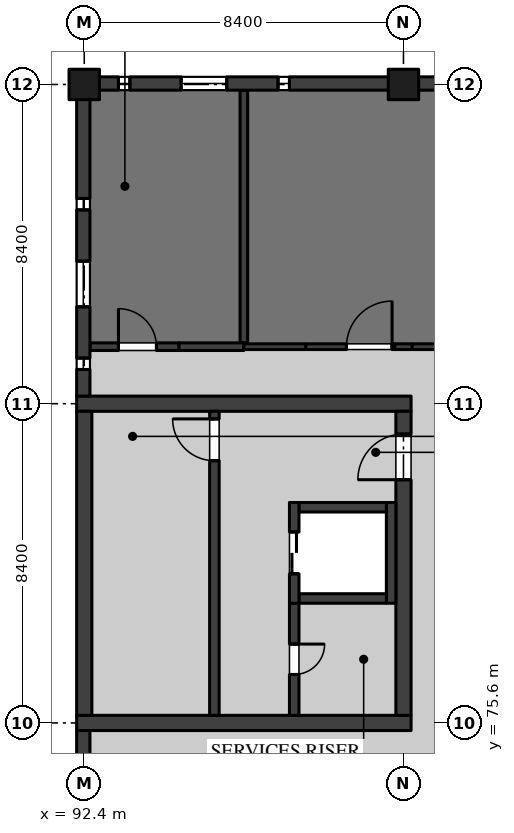
"""IFC4 building model, lengths in metres.
Left out: names, types, materials, properties, quantities, classifications, styles, units other than length and angle.
Written with IfcOpenShell. Run it as: python <this file> out.ifc"""

import sys

from ifc_helpers import new_model, si_unit, direction, frame, frame_2d, origin, origin_2d, place, context, subcontext, project, spatial, rectangle, extrude, element, fill, save


model = new_model("IFC4")
c1 = context("Model", 3, precision=1e-05, world=origin(), true_north=direction((0.0, 1.0)))
c2 = subcontext(c1, "Body", "Model", "MODEL_VIEW")
j1 = project(units=[si_unit("LENGTHUNIT", "METRE"), si_unit("PLANEANGLEUNIT", "RADIAN")], contexts=[c1])
p1 = place(None, origin())
s1 = spatial("IfcSite", under=j1, at=p1, CompositionType="ELEMENT")
p2 = place(p1, origin())
s2 = spatial("IfcBuilding", under=s1, at=p2, CompositionType="ELEMENT")
p3 = place(p2, frame((0.0, 0.0, 5.4)))
s3 = spatial("IfcBuildingStorey", under=s2, at=p3, CompositionType="ELEMENT", Elevation=5.4)
for number, where, z_axis, x_axis in (
    (1, (92.4, 92.4, 0.0), (0.0, 0.0, 1.0), (1.0, 0.0, 0.0)),
    (2, (100.8, 92.4, 0.0), (0.0, 0.0, 1.0), (1.0, 0.0, 0.0)),
):
    element("IfcColumn", number, at=place(p3, frame(where, z_axis=z_axis, x_axis=x_axis)), inside=s3, PredefinedType="COLUMN", context=c2, shape_type="SweptSolid", body=[
        extrude(rectangle(XDim=0.8, YDim=0.8, at=origin_2d()), origin(), (0.0, 0.0, 1.0), 4.37),
    ])
for number, where, z_axis, x_axis in (
    (3, (92.2, 75.6, 0.0), (0.0, 0.0, 1.0), (1.0, 0.0, 0.0)),
    (4, (92.2, 84.0, 0.0), (0.0, 0.0, 1.0), (1.0, 0.0, 0.0)),
):
    element("IfcWall", number, at=place(p3, frame(where, z_axis=z_axis, x_axis=x_axis)), inside=s3, PredefinedType="SHEAR", context=c2, shape_type="SweptSolid", body=[
        extrude(rectangle(XDim=8.8, YDim=0.4, at=frame_2d((4.4, 0.0))), origin(), (0.0, 0.0, 1.0), 4.37),
    ])
p4 = place(p3, frame((92.4, 75.8, 0.0), z_axis=(0.0, 0.0, 1.0), x_axis=(0.0, 1.0, 0.0)))
e5 = element("IfcWall", 5, at=p4, inside=s3, PredefinedType="SHEAR", context=c2, shape_type="SweptSolid", body=[
    extrude(rectangle(XDim=8.0, YDim=0.4, at=frame_2d((4.0, 0.0))), origin(), (0.0, 0.0, 1.0), 4.37),
])
p5 = place(p3, frame((100.8, 75.8, 0.0), z_axis=(0.0, 0.0, 1.0), x_axis=(0.0, 1.0, 0.0)))
e6 = element("IfcWall", 6, at=p5, inside=s3, PredefinedType="SHEAR", context=c2, shape_type="SweptSolid", body=[
    extrude(rectangle(XDim=8.0, YDim=0.4, at=frame_2d((4.0, 0.0))), origin(), (0.0, 0.0, 1.0), 4.37),
])
p6 = place(p5, frame((6.2, 0.0, 0.0)))
e7 = element("IfcOpeningElement", 7, at=p6, cuts=e6, PredefinedType="OPENING", context=c2, shape_type="SweptSolid", body=[
    extrude(rectangle(XDim=1.2, YDim=2.1, at=frame_2d((0.6, 1.05))), frame((0.0, 0.21, 0.0), z_axis=(0.0, -1.0, 0.0), x_axis=(1.0, 0.0, 0.0)), (0.0, 0.0, 1.0), 0.42),
])
p7 = place(p3, frame((95.825, 83.8, 0.0), z_axis=(0.0, 0.0, 1.0), x_axis=(0.0, -1.0, 0.0)))
e8 = element("IfcWall", 8, at=p7, inside=s3, PredefinedType="SOLIDWALL", context=c2, shape_type="SweptSolid", body=[
    extrude(rectangle(XDim=8.0, YDim=0.25, at=frame_2d((4.0, 0.0))), origin(), (0.0, 0.0, 1.0), 4.37),
])
p8 = place(p7, frame((0.2, 0.0, 0.0)))
e9 = element("IfcOpeningElement", 9, at=p8, cuts=e8, PredefinedType="OPENING", context=c2, shape_type="SweptSolid", body=[
    extrude(rectangle(XDim=1.1, YDim=2.1, at=frame_2d((0.55, 1.05))), frame((0.0, 0.135, 0.0), z_axis=(0.0, -1.0, 0.0), x_axis=(1.0, 0.0, 0.0)), (0.0, 0.0, 1.0), 0.27),
])
p9 = place(p3, frame((97.925, 78.75, 0.0), z_axis=(0.0, 0.0, 1.0), x_axis=(0.0, -1.0, 0.0)))
e10 = element("IfcWall", 10, at=p9, inside=s3, PredefinedType="SOLIDWALL", context=c2, shape_type="SweptSolid", body=[
    extrude(rectangle(XDim=2.95, YDim=0.25, at=frame_2d((1.475, 0.0))), origin(), (0.0, 0.0, 1.0), 4.37),
])
p10 = place(p9, frame((1.075, 0.0, 0.0)))
e11 = element("IfcOpeningElement", 11, at=p10, cuts=e10, PredefinedType="OPENING", context=c2, shape_type="SweptSolid", body=[
    extrude(rectangle(XDim=0.8, YDim=2.1, at=frame_2d((0.4, 1.05))), frame((0.0, 0.135, 0.0), z_axis=(0.0, -1.0, 0.0), x_axis=(1.0, 0.0, 0.0)), (0.0, 0.0, 1.0), 0.27),
])
p11 = place(p3, frame((100.475, 78.75, 0.0), z_axis=(0.0, 0.0, 1.0), x_axis=(0.0, 1.0, 0.0)))
e12 = element("IfcWall", 12, at=p11, inside=s3, PredefinedType="SOLIDWALL", context=c2, shape_type="SweptSolid", body=[
    extrude(rectangle(XDim=2.65, YDim=0.25, at=frame_2d((1.325, 0.0))), origin(), (0.0, 0.0, 1.0), 4.37),
])
for number, where, z_axis, x_axis in (
    (13, (98.05, 81.275, 0.0), (0.0, 0.0, 1.0), (1.0, 0.0, 0.0)),
    (14, (98.05, 78.875, 0.0), (0.0, 0.0, 1.0), (1.0, 0.0, 0.0)),
):
    element("IfcWall", number, at=place(p3, frame(where, z_axis=z_axis, x_axis=x_axis)), inside=s3, PredefinedType="SOLIDWALL", context=c2, shape_type="SweptSolid", body=[
        extrude(rectangle(XDim=2.3, YDim=0.25, at=frame_2d((1.15, 0.0))), origin(), (0.0, 0.0, 1.0), 4.37),
    ])
p12 = place(p3, frame((97.925, 78.75, 0.0), z_axis=(0.0, 0.0, 1.0), x_axis=(0.0, 1.0, 0.0)))
e15 = element("IfcWall", 15, at=p12, inside=s3, PredefinedType="SOLIDWALL", context=c2, shape_type="SweptSolid", body=[
    extrude(rectangle(XDim=2.65, YDim=0.25, at=frame_2d((1.325, 0.0))), origin(), (0.0, 0.0, 1.0), 4.37),
])
p13 = place(p12, frame((0.775, 0.0, 0.0)))
e16 = element("IfcOpeningElement", 16, at=p13, cuts=e15, PredefinedType="OPENING", context=c2, shape_type="SweptSolid", body=[
    extrude(rectangle(XDim=1.1, YDim=2.1, at=frame_2d((0.55, 1.05))), frame((0.0, 0.135, 0.0), z_axis=(0.0, -1.0, 0.0), x_axis=(1.0, 0.0, 0.0)), (0.0, 0.0, 1.0), 0.27),
])
p14 = place(p3, frame((96.6, 85.6, 0.0), z_axis=(0.0, 0.0, 1.0), x_axis=(0.0, 1.0, 0.0)))
e17 = element("IfcWall", 17, at=p14, inside=s3, PredefinedType="PARTITIONING", context=c2, shape_type="SweptSolid", body=[
    extrude(rectangle(XDim=6.65, YDim=0.2, at=frame_2d((3.325, 0.0))), origin(), (0.0, 0.0, 1.0), 4.37),
])
p15 = place(p3, frame((92.55, 85.5, 0.0), z_axis=(0.0, 0.0, 1.0), x_axis=(1.0, 0.0, 0.0)))
e18 = element("IfcWall", 18, at=p15, inside=s3, PredefinedType="PARTITIONING", context=c2, shape_type="SweptSolid", body=[
    extrude(rectangle(XDim=2.345, YDim=0.2, at=frame_2d((1.172, 0.0))), origin(), (0.0, 0.0, 1.0), 4.37),
])
p16 = place(p15, frame((0.75, 0.0, 0.0)))
e19 = element("IfcOpeningElement", 19, at=p16, cuts=e18, PredefinedType="OPENING", context=c2, shape_type="SweptSolid", body=[
    extrude(rectangle(XDim=1.0, YDim=2.1, at=frame_2d((0.5, 1.05))), frame((0.0, 0.11, 0.0), z_axis=(0.0, -1.0, 0.0), x_axis=(1.0, 0.0, 0.0)), (0.0, 0.0, 1.0), 0.22),
])
p17 = place(p3, frame((94.895, 85.5, 0.0), z_axis=(0.0, 0.0, 1.0), x_axis=(1.0, 0.0, 0.0)))
e20 = element("IfcWall", 20, at=p17, inside=s3, PredefinedType="PARTITIONING", context=c2, shape_type="SweptSolid", body=[
    extrude(rectangle(XDim=1.705, YDim=0.2, at=frame_2d((0.853, 0.0))), origin(), (0.0, 0.0, 1.0), 3.895),
])
p18 = place(p3, frame((96.6, 85.5, 0.0), z_axis=(0.0, 0.0, 1.0), x_axis=(1.0, 0.0, 0.0)))
e21 = element("IfcWall", 21, at=p18, inside=s3, PredefinedType="PARTITIONING", context=c2, shape_type="SweptSolid", body=[
    extrude(rectangle(XDim=1.63, YDim=0.15, at=frame_2d((0.815, 0.0))), origin(), (0.0, 0.0, 1.0), 3.895),
])
p19 = place(p3, frame((98.23, 85.5, 0.0), z_axis=(0.0, 0.0, 1.0), x_axis=(1.0, 0.0, 0.0)))
e22 = element("IfcWall", 22, at=p19, inside=s3, PredefinedType="PARTITIONING", context=c2, shape_type="SweptSolid", body=[
    extrude(rectangle(XDim=2.34, YDim=0.15, at=frame_2d((1.17, 0.0))), origin(), (0.0, 0.0, 1.0), 4.37),
])
p20 = place(p19, frame((1.07, 0.0, 0.0)))
e23 = element("IfcOpeningElement", 23, at=p20, cuts=e22, PredefinedType="OPENING", context=c2, shape_type="SweptSolid", body=[
    extrude(rectangle(XDim=1.2, YDim=2.4, at=frame_2d((0.6, 1.2))), frame((0.0, 0.085, 0.0), z_axis=(0.0, -1.0, 0.0), x_axis=(1.0, 0.0, 0.0)), (0.0, 0.0, 1.0), 0.17),
])
p21 = place(p3, frame((100.57, 85.5, 0.0), z_axis=(0.0, 0.0, 1.0), x_axis=(1.0, 0.0, 0.0)))
e24 = element("IfcWall", 24, at=p21, inside=s3, PredefinedType="PARTITIONING", context=c2, shape_type="SweptSolid", body=[
    extrude(rectangle(XDim=0.46, YDim=0.15, at=frame_2d((0.23, 0.0))), origin(), (0.0, 0.0, 1.0), 3.746),
])
p22 = place(p3, frame((101.03, 85.5, 0.0), z_axis=(0.0, 0.0, 1.0), x_axis=(1.0, 0.0, 0.0)))
e25 = element("IfcWall", 25, at=p22, inside=s3, PredefinedType="PARTITIONING", context=c2, shape_type="SweptSolid", body=[
    extrude(rectangle(XDim=2.34, YDim=0.15, at=frame_2d((1.17, 0.0))), origin(), (0.0, 0.0, 1.0), 4.37),
])
p23 = place(p3, frame((108.82, 92.425, 0.0), z_axis=(0.0, 0.0, 1.0), x_axis=(-1.0, 0.0, 0.0)))
e26 = element("IfcWall", 26, at=p23, inside=s3, PredefinedType="SOLIDWALL", context=c2, shape_type="SweptSolid", body=[
    extrude(rectangle(XDim=7.64, YDim=0.35, at=frame_2d((3.82, 0.0))), origin(), (0.0, 0.0, 1.0), 3.746),
])
p24 = place(p23, frame((2.62, 0.0, 1.5)))
e27 = element("IfcOpeningElement", 27, at=p24, cuts=e26, PredefinedType="OPENING", context=c2, shape_type="SweptSolid", body=[
    extrude(rectangle(XDim=0.3, YDim=1.5, at=frame_2d((0.15, 0.75))), frame((0.0, 0.185, 0.0), z_axis=(0.0, -1.0, 0.0), x_axis=(1.0, 0.0, 0.0)), (0.0, 0.0, 1.0), 0.37),
])
p25 = place(p23, frame((4.27, 0.0, 1.5)))
e28 = element("IfcOpeningElement", 28, at=p25, cuts=e26, PredefinedType="OPENING", context=c2, shape_type="SweptSolid", body=[
    extrude(rectangle(XDim=1.2, YDim=1.8, at=frame_2d((0.6, 0.9))), frame((0.0, 0.185, 0.0), z_axis=(0.0, -1.0, 0.0), x_axis=(1.0, 0.0, 0.0)), (0.0, 0.0, 1.0), 0.37),
])
p26 = place(p23, frame((6.82, 0.0, 1.5)))
e29 = element("IfcOpeningElement", 29, at=p26, cuts=e26, PredefinedType="OPENING", context=c2, shape_type="SweptSolid", body=[
    extrude(rectangle(XDim=0.3, YDim=1.5, at=frame_2d((0.15, 0.75))), frame((0.0, 0.185, 0.0), z_axis=(0.0, -1.0, 0.0), x_axis=(1.0, 0.0, 0.0)), (0.0, 0.0, 1.0), 0.37),
])
p27 = place(p3, frame((100.42, 92.425, 0.0), z_axis=(0.0, 0.0, 1.0), x_axis=(-1.0, 0.0, 0.0)))
e30 = element("IfcWall", 30, at=p27, inside=s3, PredefinedType="SOLIDWALL", context=c2, shape_type="SweptSolid", body=[
    extrude(rectangle(XDim=7.64, YDim=0.35, at=frame_2d((3.82, 0.0))), origin(), (0.0, 0.0, 1.0), 3.746),
])
p28 = place(p27, frame((2.62, 0.0, 1.5)))
e31 = element("IfcOpeningElement", 31, at=p28, cuts=e30, PredefinedType="OPENING", context=c2, shape_type="SweptSolid", body=[
    extrude(rectangle(XDim=0.3, YDim=1.5, at=frame_2d((0.15, 0.75))), frame((0.0, 0.185, 0.0), z_axis=(0.0, -1.0, 0.0), x_axis=(1.0, 0.0, 0.0)), (0.0, 0.0, 1.0), 0.37),
])
p29 = place(p27, frame((4.27, 0.0, 1.5)))
e32 = element("IfcOpeningElement", 32, at=p29, cuts=e30, PredefinedType="OPENING", context=c2, shape_type="SweptSolid", body=[
    extrude(rectangle(XDim=1.2, YDim=1.8, at=frame_2d((0.6, 0.9))), frame((0.0, 0.185, 0.0), z_axis=(0.0, -1.0, 0.0), x_axis=(1.0, 0.0, 0.0)), (0.0, 0.0, 1.0), 0.37),
])
p30 = place(p27, frame((6.82, 0.0, 1.5)))
e33 = element("IfcOpeningElement", 33, at=p30, cuts=e30, PredefinedType="OPENING", context=c2, shape_type="SweptSolid", body=[
    extrude(rectangle(XDim=0.3, YDim=1.5, at=frame_2d((0.15, 0.75))), frame((0.0, 0.185, 0.0), z_axis=(0.0, -1.0, 0.0), x_axis=(1.0, 0.0, 0.0)), (0.0, 0.0, 1.0), 0.37),
])
p31 = place(p3, frame((92.375, 92.02, 0.0), z_axis=(0.0, 0.0, 1.0), x_axis=(0.0, -1.0, 0.0)))
e34 = element("IfcWall", 34, at=p31, inside=s3, PredefinedType="SOLIDWALL", context=c2, shape_type="SweptSolid", body=[
    extrude(rectangle(XDim=7.82, YDim=0.35, at=frame_2d((3.91, 0.0))), origin(), (0.0, 0.0, 1.0), 3.746),
])
p32 = place(p31, frame((2.62, 0.0, 1.5)))
e35 = element("IfcOpeningElement", 35, at=p32, cuts=e34, PredefinedType="OPENING", context=c2, shape_type="SweptSolid", body=[
    extrude(rectangle(XDim=0.3, YDim=1.5, at=frame_2d((0.15, 0.75))), frame((0.0, 0.185, 0.0), z_axis=(0.0, -1.0, 0.0), x_axis=(1.0, 0.0, 0.0)), (0.0, 0.0, 1.0), 0.37),
])
p33 = place(p31, frame((4.27, 0.0, 1.5)))
e36 = element("IfcOpeningElement", 36, at=p33, cuts=e34, PredefinedType="OPENING", context=c2, shape_type="SweptSolid", body=[
    extrude(rectangle(XDim=1.2, YDim=1.5, at=frame_2d((0.6, 0.75))), frame((0.0, 0.185, 0.0), z_axis=(0.0, -1.0, 0.0), x_axis=(1.0, 0.0, 0.0)), (0.0, 0.0, 1.0), 0.37),
])
p34 = place(p31, frame((6.82, 0.0, 1.5)))
e37 = element("IfcOpeningElement", 37, at=p34, cuts=e34, PredefinedType="OPENING", context=c2, shape_type="SweptSolid", body=[
    extrude(rectangle(XDim=0.3, YDim=1.5, at=frame_2d((0.15, 0.75))), frame((0.0, 0.185, 0.0), z_axis=(0.0, -1.0, 0.0), x_axis=(1.0, 0.0, 0.0)), (0.0, 0.0, 1.0), 0.37),
])
p35 = place(p3, frame((92.375, 75.4, 0.0), z_axis=(0.0, 0.0, 1.0), x_axis=(0.0, -1.0, 0.0)))
e38 = element("IfcWall", 38, at=p35, inside=s3, PredefinedType="SOLIDWALL", context=c2, shape_type="SweptSolid", body=[
    extrude(rectangle(XDim=8.0, YDim=0.35, at=frame_2d((4.0, 0.0))), origin(), (0.0, 0.0, 1.0), 3.746),
])
p36 = place(p35, frame((2.8, 0.0, 1.5)))
e39 = element("IfcOpeningElement", 39, at=p36, cuts=e38, PredefinedType="OPENING", context=c2, shape_type="SweptSolid", body=[
    extrude(rectangle(XDim=0.3, YDim=1.5, at=frame_2d((0.15, 0.75))), frame((0.0, 0.185, 0.0), z_axis=(0.0, -1.0, 0.0), x_axis=(1.0, 0.0, 0.0)), (0.0, 0.0, 1.0), 0.37),
])
p37 = place(p35, frame((4.45, 0.0, 1.5)))
e40 = element("IfcOpeningElement", 40, at=p37, cuts=e38, PredefinedType="OPENING", context=c2, shape_type="SweptSolid", body=[
    extrude(rectangle(XDim=1.2, YDim=1.5, at=frame_2d((0.6, 0.75))), frame((0.0, 0.185, 0.0), z_axis=(0.0, -1.0, 0.0), x_axis=(1.0, 0.0, 0.0)), (0.0, 0.0, 1.0), 0.37),
])
p38 = place(p35, frame((7.0, 0.0, 1.5)))
e41 = element("IfcOpeningElement", 41, at=p38, cuts=e38, PredefinedType="OPENING", context=c2, shape_type="SweptSolid", body=[
    extrude(rectangle(XDim=0.3, YDim=1.5, at=frame_2d((0.15, 0.75))), frame((0.0, 0.185, 0.0), z_axis=(0.0, -1.0, 0.0), x_axis=(1.0, 0.0, 0.0)), (0.0, 0.0, 1.0), 0.37),
])
p39 = place(p6, origin())
e42 = element("IfcDoor", 42, at=p39, inside=s3, OperationType="SINGLE_SWING_RIGHT", PredefinedType="DOOR", context=c2, shape_type="SweptSolid", body=[
    extrude(rectangle(XDim=1.2, YDim=2.1, at=frame_2d((0.6, 1.05))), frame((0.0, 0.035, 0.0), z_axis=(0.0, -1.0, 0.0), x_axis=(1.0, 0.0, 0.0)), (0.0, 0.0, 1.0), 0.07),
])
fill(e7, e42)
p40 = place(p10, origin())
e43 = element("IfcDoor", 43, at=p40, inside=s3, OperationType="SINGLE_SWING_RIGHT", PredefinedType="DOOR", context=c2, shape_type="SweptSolid", body=[
    extrude(rectangle(XDim=0.8, YDim=2.1, at=frame_2d((0.4, 1.05))), frame((0.0, 0.035, 0.0), z_axis=(0.0, -1.0, 0.0), x_axis=(1.0, 0.0, 0.0)), (0.0, 0.0, 1.0), 0.07),
])
fill(e11, e43)
p41 = place(p8, frame((1.1, 0.0, 0.0), z_axis=(0.0, 0.0, 1.0), x_axis=(-1.0, 0.0, 0.0)))
e44 = element("IfcDoor", 44, at=p41, inside=s3, OperationType="SINGLE_SWING_LEFT", PredefinedType="DOOR", context=c2, shape_type="SweptSolid", body=[
    extrude(rectangle(XDim=1.1, YDim=2.1, at=frame_2d((0.55, 1.05))), frame((0.0, 0.035, 0.0), z_axis=(0.0, -1.0, 0.0), x_axis=(1.0, 0.0, 0.0)), (0.0, 0.0, 1.0), 0.07),
])
fill(e9, e44)
p42 = place(p13, origin())
e45 = element("IfcDoor", 45, at=p42, inside=s3, OperationType="DOUBLE_DOOR_SLIDING", PredefinedType="DOOR", context=c2, shape_type="SweptSolid", body=[
    extrude(rectangle(XDim=1.1, YDim=2.1, at=frame_2d((0.55, 1.05))), frame((0.0, 0.04, 0.0), z_axis=(0.0, -1.0, 0.0), x_axis=(1.0, 0.0, 0.0)), (0.0, 0.0, 1.0), 0.08),
])
fill(e16, e45)
p43 = place(p16, origin())
e46 = element("IfcDoor", 46, at=p43, inside=s3, OperationType="SINGLE_SWING_RIGHT", PredefinedType="DOOR", context=c2, shape_type="SweptSolid", body=[
    extrude(rectangle(XDim=1.0, YDim=2.1, at=frame_2d((0.5, 1.05))), frame((0.0, 0.045, 0.0), z_axis=(0.0, -1.0, 0.0), x_axis=(1.0, 0.0, 0.0)), (0.0, 0.0, 1.0), 0.09),
])
fill(e19, e46)
p44 = place(p20, origin())
e47 = element("IfcDoor", 47, at=p44, inside=s3, OperationType="SINGLE_SWING_LEFT", PredefinedType="DOOR", context=c2, shape_type="SweptSolid", body=[
    extrude(rectangle(XDim=1.2, YDim=2.4, at=frame_2d((0.6, 1.2))), frame((0.0, 0.025, 0.0), z_axis=(0.0, -1.0, 0.0), x_axis=(1.0, 0.0, 0.0)), (0.0, 0.0, 1.0), 0.05),
])
fill(e23, e47)
p45 = place(p28, origin())
e48 = element("IfcWindow", 48, at=p45, inside=s3, PartitioningType="SINGLE_PANEL", PredefinedType="WINDOW", context=c2, shape_type="SweptSolid", body=[
    extrude(rectangle(XDim=0.3, YDim=1.5, at=frame_2d((0.15, 0.75))), frame((0.0, 0.05, 0.0), z_axis=(0.0, -1.0, 0.0), x_axis=(1.0, 0.0, 0.0)), (0.0, 0.0, 1.0), 0.1),
])
fill(e31, e48)
p46 = place(p29, origin())
e49 = element("IfcWindow", 49, at=p46, inside=s3, PartitioningType="SINGLE_PANEL", PredefinedType="WINDOW", context=c2, shape_type="SweptSolid", body=[
    extrude(rectangle(XDim=1.2, YDim=1.8, at=frame_2d((0.6, 0.9))), frame((0.0, 0.03, 0.0), z_axis=(0.0, -1.0, 0.0), x_axis=(1.0, 0.0, 0.0)), (0.0, 0.0, 1.0), 0.06),
])
fill(e32, e49)
p47 = place(p30, origin())
e50 = element("IfcWindow", 50, at=p47, inside=s3, PartitioningType="SINGLE_PANEL", PredefinedType="WINDOW", context=c2, shape_type="SweptSolid", body=[
    extrude(rectangle(XDim=0.3, YDim=1.5, at=frame_2d((0.15, 0.75))), frame((0.0, 0.05, 0.0), z_axis=(0.0, -1.0, 0.0), x_axis=(1.0, 0.0, 0.0)), (0.0, 0.0, 1.0), 0.1),
])
fill(e33, e50)
p48 = place(p32, origin())
e51 = element("IfcWindow", 51, at=p48, inside=s3, PartitioningType="SINGLE_PANEL", PredefinedType="WINDOW", context=c2, shape_type="SweptSolid", body=[
    extrude(rectangle(XDim=0.3, YDim=1.5, at=frame_2d((0.15, 0.75))), frame((0.0, 0.05, 0.0), z_axis=(0.0, -1.0, 0.0), x_axis=(1.0, 0.0, 0.0)), (0.0, 0.0, 1.0), 0.1),
])
fill(e35, e51)
p49 = place(p33, origin())
e52 = element("IfcWindow", 52, at=p49, inside=s3, PartitioningType="SINGLE_PANEL", PredefinedType="WINDOW", context=c2, shape_type="SweptSolid", body=[
    extrude(rectangle(XDim=1.2, YDim=1.5, at=frame_2d((0.6, 0.75))), frame((0.0, 0.04, 0.0), z_axis=(0.0, -1.0, 0.0), x_axis=(1.0, 0.0, 0.0)), (0.0, 0.0, 1.0), 0.08),
])
fill(e36, e52)
p50 = place(p34, origin())
e53 = element("IfcWindow", 53, at=p50, inside=s3, PartitioningType="SINGLE_PANEL", PredefinedType="WINDOW", context=c2, shape_type="SweptSolid", body=[
    extrude(rectangle(XDim=0.3, YDim=1.5, at=frame_2d((0.15, 0.75))), frame((0.0, 0.05, 0.0), z_axis=(0.0, -1.0, 0.0), x_axis=(1.0, 0.0, 0.0)), (0.0, 0.0, 1.0), 0.1),
])
fill(e37, e53)
save(model, sys.argv[1])
